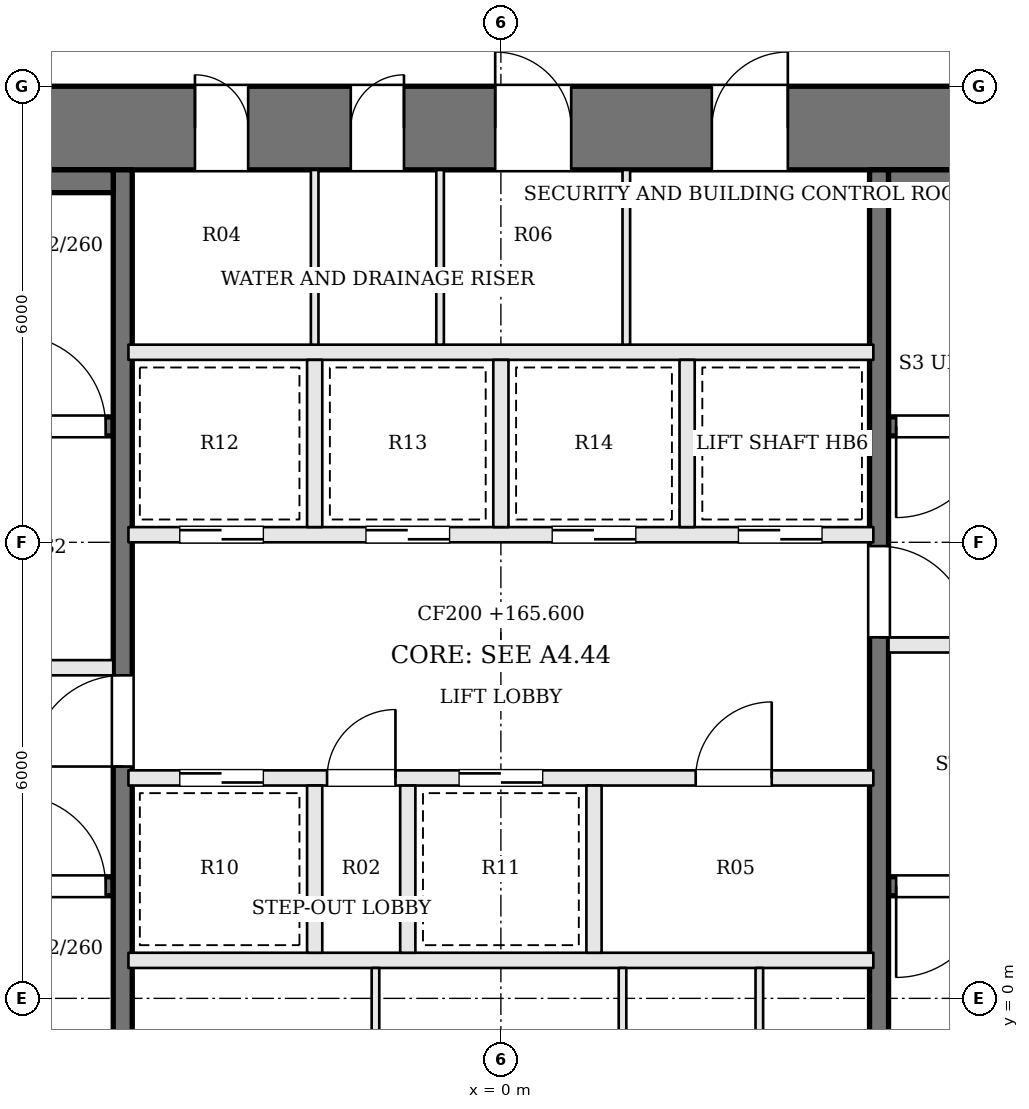
"""IFC4 building model, lengths in metres.
Left out: names, types, materials, properties, quantities, classifications, styles, units other than length and angle.
Written with IfcOpenShell. Run it as: python <this file> out.ifc"""

import sys

from ifc_helpers import new_model, si_unit, direction, frame, frame_2d, origin, place, context, subcontext, project, spatial, rectangle, extrude, element, fill, save


model = new_model("IFC4")
c1 = context("Model", 3, precision=1e-05, world=origin(), true_north=direction((0.0, 1.0)))
c2 = subcontext(c1, "Body", "Model", "MODEL_VIEW")
j1 = project(units=[si_unit("LENGTHUNIT", "METRE"), si_unit("PLANEANGLEUNIT", "RADIAN")], contexts=[c1])
p1 = place(None, origin())
s1 = spatial("IfcSite", under=j1, at=p1, CompositionType="ELEMENT")
p2 = place(p1, origin())
s2 = spatial("IfcBuilding", under=s1, at=p2, CompositionType="ELEMENT")
p3 = place(p2, frame((0.0, 0.0, 165.6)))
s3 = spatial("IfcBuildingStorey", under=s2, at=p3, CompositionType="ELEMENT", Elevation=165.6)
p4 = place(p3, frame((-13.0, 11.45, 0.0), z_axis=(0.0, 0.0, 1.0), x_axis=(1.0, 0.0, 0.0)))
e1 = element("IfcWall", 1, at=p4, inside=s3, PredefinedType="SHEAR", context=c2, shape_type="SweptSolid", body=[
    extrude(rectangle(XDim=26.0, YDim=1.1, at=frame_2d((13.0, 0.0))), origin(), (0.0, 0.0, 1.0), 3.9),
])
p5 = place(p4, frame((8.975, 0.0, 0.0)))
e2 = element("IfcOpeningElement", 2, at=p5, cuts=e1, PredefinedType="OPENING", context=c2, shape_type="SweptSolid", body=[
    extrude(rectangle(XDim=0.7, YDim=2.1, at=frame_2d((0.35, 1.05))), frame((0.0, 0.56, 0.0), z_axis=(0.0, -1.0, 0.0), x_axis=(1.0, 0.0, 0.0)), (0.0, 0.0, 1.0), 1.12),
])
p6 = place(p4, frame((11.025, 0.0, 0.0)))
e3 = element("IfcOpeningElement", 3, at=p6, cuts=e1, PredefinedType="OPENING", context=c2, shape_type="SweptSolid", body=[
    extrude(rectangle(XDim=0.7, YDim=2.1, at=frame_2d((0.35, 1.05))), frame((0.0, 0.56, 0.0), z_axis=(0.0, -1.0, 0.0), x_axis=(1.0, 0.0, 0.0)), (0.0, 0.0, 1.0), 1.12),
])
p7 = place(p4, frame((12.925, 0.0, 0.0)))
e4 = element("IfcOpeningElement", 4, at=p7, cuts=e1, PredefinedType="OPENING", context=c2, shape_type="SweptSolid", body=[
    extrude(rectangle(XDim=1.0, YDim=2.1, at=frame_2d((0.5, 1.05))), frame((0.0, 0.56, 0.0), z_axis=(0.0, -1.0, 0.0), x_axis=(1.0, 0.0, 0.0)), (0.0, 0.0, 1.0), 1.12),
])
p8 = place(p4, frame((15.775, 0.0, 0.0)))
e5 = element("IfcOpeningElement", 5, at=p8, cuts=e1, PredefinedType="OPENING", context=c2, shape_type="SweptSolid", body=[
    extrude(rectangle(XDim=1.0, YDim=2.1, at=frame_2d((0.5, 1.05))), frame((0.0, 0.56, 0.0), z_axis=(0.0, -1.0, 0.0), x_axis=(1.0, 0.0, 0.0)), (0.0, 0.0, 1.0), 1.12),
])
p9 = place(p3, frame((-11.9, 1.475, 0.0), z_axis=(0.0, 0.0, 1.0), x_axis=(1.0, 0.0, 0.0)))
e6 = element("IfcWall", 6, at=p9, inside=s3, PredefinedType="SOLIDWALL", context=c2, shape_type="SweptSolid", body=[
    extrude(rectangle(XDim=6.8, YDim=0.25, at=frame_2d((3.4, 0.0))), origin(), (0.0, 0.0, 1.0), 3.6),
])
p10 = place(p9, frame((5.5, 0.0, 0.0)))
e7 = element("IfcOpeningElement", 7, at=p10, cuts=e6, PredefinedType="OPENING", context=c2, shape_type="SweptSolid", body=[
    extrude(rectangle(XDim=1.2, YDim=2.1, at=frame_2d((0.6, 1.05))), frame((0.0, 0.135, 0.0), z_axis=(0.0, -1.0, 0.0), x_axis=(1.0, 0.0, 0.0)), (0.0, 0.0, 1.0), 0.27),
])
p11 = place(p3, frame((11.9, 7.525, 0.0), z_axis=(0.0, 0.0, 1.0), x_axis=(-1.0, 0.0, 0.0)))
e8 = element("IfcWall", 8, at=p11, inside=s3, PredefinedType="SOLIDWALL", context=c2, shape_type="SweptSolid", body=[
    extrude(rectangle(XDim=6.8, YDim=0.25, at=frame_2d((3.4, 0.0))), origin(), (0.0, 0.0, 1.0), 3.6),
])
p12 = place(p11, frame((5.5, 0.0, 0.0)))
e9 = element("IfcOpeningElement", 9, at=p12, cuts=e8, PredefinedType="OPENING", context=c2, shape_type="SweptSolid", body=[
    extrude(rectangle(XDim=1.2, YDim=2.1, at=frame_2d((0.6, 1.05))), frame((0.0, 0.135, 0.0), z_axis=(0.0, -1.0, 0.0), x_axis=(1.0, 0.0, 0.0)), (0.0, 0.0, 1.0), 0.27),
])
p13 = place(p3, frame((-11.9, 4.35, 0.0), z_axis=(0.0, 0.0, 1.0), x_axis=(1.0, 0.0, 0.0)))
e10 = element("IfcWall", 10, at=p13, inside=s3, PredefinedType="SOLIDWALL", context=c2, shape_type="SweptSolid", body=[
    extrude(rectangle(XDim=6.8, YDim=0.2, at=frame_2d((3.4, 0.0))), origin(), (0.0, 0.0, 1.0), 3.6),
])
p14 = place(p13, frame((4.1, 0.0, 0.0)))
e11 = element("IfcOpeningElement", 11, at=p14, cuts=e10, PredefinedType="OPENING", context=c2, shape_type="SweptSolid", body=[
    extrude(rectangle(XDim=1.2, YDim=2.1, at=frame_2d((0.6, 1.05))), frame((0.0, 0.11, 0.0), z_axis=(0.0, -1.0, 0.0), x_axis=(1.0, 0.0, 0.0)), (0.0, 0.0, 1.0), 0.22),
])
p15 = place(p13, frame((0.8, 0.0, 0.0)))
e12 = element("IfcOpeningElement", 12, at=p15, cuts=e10, PredefinedType="OPENING", context=c2, shape_type="SweptSolid", body=[
    extrude(rectangle(XDim=1.2, YDim=2.1, at=frame_2d((0.6, 1.05))), frame((0.0, 0.11, 0.0), z_axis=(0.0, -1.0, 0.0), x_axis=(1.0, 0.0, 0.0)), (0.0, 0.0, 1.0), 0.22),
])
p16 = place(p3, frame((11.9, 4.65, 0.0), z_axis=(0.0, 0.0, 1.0), x_axis=(-1.0, 0.0, 0.0)))
e13 = element("IfcWall", 13, at=p16, inside=s3, PredefinedType="SOLIDWALL", context=c2, shape_type="SweptSolid", body=[
    extrude(rectangle(XDim=6.8, YDim=0.2, at=frame_2d((3.4, 0.0))), origin(), (0.0, 0.0, 1.0), 3.6),
])
p17 = place(p16, frame((4.1, 0.0, 0.0)))
e14 = element("IfcOpeningElement", 14, at=p17, cuts=e13, PredefinedType="OPENING", context=c2, shape_type="SweptSolid", body=[
    extrude(rectangle(XDim=1.2, YDim=2.1, at=frame_2d((0.6, 1.05))), frame((0.0, 0.11, 0.0), z_axis=(0.0, -1.0, 0.0), x_axis=(1.0, 0.0, 0.0)), (0.0, 0.0, 1.0), 0.22),
])
p18 = place(p16, frame((0.8, 0.0, 0.0)))
e15 = element("IfcOpeningElement", 15, at=p18, cuts=e13, PredefinedType="OPENING", context=c2, shape_type="SweptSolid", body=[
    extrude(rectangle(XDim=1.2, YDim=2.1, at=frame_2d((0.6, 1.05))), frame((0.0, 0.11, 0.0), z_axis=(0.0, -1.0, 0.0), x_axis=(1.0, 0.0, 0.0)), (0.0, 0.0, 1.0), 0.22),
])
p19 = place(p3, frame((-11.9, 7.525, 0.0), z_axis=(0.0, 0.0, 1.0), x_axis=(1.0, 0.0, 0.0)))
e16 = element("IfcWall", 16, at=p19, inside=s3, PredefinedType="SOLIDWALL", context=c2, shape_type="SweptSolid", body=[
    extrude(rectangle(XDim=6.8, YDim=0.25, at=frame_2d((3.4, 0.0))), origin(), (0.0, 0.0, 1.0), 3.6),
])
p20 = place(p19, frame((5.5, 0.0, 0.0)))
e17 = element("IfcOpeningElement", 17, at=p20, cuts=e16, PredefinedType="OPENING", context=c2, shape_type="SweptSolid", body=[
    extrude(rectangle(XDim=1.2, YDim=2.1, at=frame_2d((0.6, 1.05))), frame((0.0, 0.135, 0.0), z_axis=(0.0, -1.0, 0.0), x_axis=(1.0, 0.0, 0.0)), (0.0, 0.0, 1.0), 0.27),
])
p21 = place(p3, frame((11.9, 1.475, 0.0), z_axis=(0.0, 0.0, 1.0), x_axis=(-1.0, 0.0, 0.0)))
e18 = element("IfcWall", 18, at=p21, inside=s3, PredefinedType="SOLIDWALL", context=c2, shape_type="SweptSolid", body=[
    extrude(rectangle(XDim=6.8, YDim=0.25, at=frame_2d((3.4, 0.0))), origin(), (0.0, 0.0, 1.0), 3.6),
])
p22 = place(p21, frame((5.5, 0.0, 0.0)))
e19 = element("IfcOpeningElement", 19, at=p22, cuts=e18, PredefinedType="OPENING", context=c2, shape_type="SweptSolid", body=[
    extrude(rectangle(XDim=1.2, YDim=2.1, at=frame_2d((0.6, 1.05))), frame((0.0, 0.135, 0.0), z_axis=(0.0, -1.0, 0.0), x_axis=(1.0, 0.0, 0.0)), (0.0, 0.0, 1.0), 0.27),
])
p23 = place(p3, frame((-4.975, -1.9, 0.0), z_axis=(0.0, 0.0, 1.0), x_axis=(0.0, 1.0, 0.0)))
e20 = element("IfcWall", 20, at=p23, inside=s3, PredefinedType="SOLIDWALL", context=c2, shape_type="SweptSolid", body=[
    extrude(rectangle(XDim=12.8, YDim=0.25, at=frame_2d((6.4, 0.0))), origin(), (0.0, 0.0, 1.0), 3.6),
])
p24 = place(p23, frame((4.95, 0.0, 0.0)))
e21 = element("IfcOpeningElement", 21, at=p24, cuts=e20, PredefinedType="OPENING", context=c2, shape_type="SweptSolid", body=[
    extrude(rectangle(XDim=1.2, YDim=2.1, at=frame_2d((0.6, 1.05))), frame((0.0, 0.135, 0.0), z_axis=(0.0, -1.0, 0.0), x_axis=(1.0, 0.0, 0.0)), (0.0, 0.0, 1.0), 0.27),
])
p25 = place(p3, frame((4.975, 10.9, 0.0), z_axis=(0.0, 0.0, 1.0), x_axis=(0.0, -1.0, 0.0)))
e22 = element("IfcWall", 22, at=p25, inside=s3, PredefinedType="SOLIDWALL", context=c2, shape_type="SweptSolid", body=[
    extrude(rectangle(XDim=12.8, YDim=0.25, at=frame_2d((6.4, 0.0))), origin(), (0.0, 0.0, 1.0), 3.6),
])
p26 = place(p25, frame((4.95, 0.0, 0.0)))
e23 = element("IfcOpeningElement", 23, at=p26, cuts=e22, PredefinedType="OPENING", context=c2, shape_type="SweptSolid", body=[
    extrude(rectangle(XDim=1.2, YDim=2.1, at=frame_2d((0.6, 1.05))), frame((0.0, 0.135, 0.0), z_axis=(0.0, -1.0, 0.0), x_axis=(1.0, 0.0, 0.0)), (0.0, 0.0, 1.0), 0.27),
])
for number, where, z_axis, x_axis in (
    (24, (-11.9, 10.75, 0.0), (0.0, 0.0, 1.0), (1.0, 0.0, 0.0)),
    (25, (11.9, 10.75, 0.0), (0.0, 0.0, 1.0), (-1.0, 0.0, 0.0)),
):
    element("IfcWall", number, at=place(p3, frame(where, z_axis=z_axis, x_axis=x_axis)), inside=s3, PredefinedType="SOLIDWALL", context=c2, shape_type="SweptSolid", body=[
        extrude(rectangle(XDim=6.8, YDim=0.3, at=frame_2d((3.4, 0.0))), origin(), (0.0, 0.0, 1.0), 3.6),
    ])
p27 = place(p3, frame((-4.9, 0.5, 0.0), z_axis=(0.0, 0.0, 1.0), x_axis=(1.0, 0.0, 0.0)))
e26 = element("IfcWall", 26, at=p27, inside=s3, PredefinedType="SOLIDWALL", context=c2, shape_type="SweptSolid", body=[
    extrude(rectangle(XDim=9.8, YDim=0.2, at=frame_2d((4.9, 0.0))), origin(), (0.0, 0.0, 1.0), 3.6),
])
p28 = place(p3, frame((-4.9, 2.9, 0.0), z_axis=(0.0, 0.0, 1.0), x_axis=(1.0, 0.0, 0.0)))
e27 = element("IfcWall", 27, at=p28, inside=s3, PredefinedType="SOLIDWALL", context=c2, shape_type="SweptSolid", body=[
    extrude(rectangle(XDim=9.8, YDim=0.2, at=frame_2d((4.9, 0.0))), origin(), (0.0, 0.0, 1.0), 3.6),
])
p29 = place(p28, frame((0.675, 0.0, 0.0)))
e28 = element("IfcOpeningElement", 28, at=p29, cuts=e27, PredefinedType="OPENING", context=c2, shape_type="SweptSolid", body=[
    extrude(rectangle(XDim=1.1, YDim=2.1, at=frame_2d((0.55, 1.05))), frame((0.0, 0.11, 0.0), z_axis=(0.0, -1.0, 0.0), x_axis=(1.0, 0.0, 0.0)), (0.0, 0.0, 1.0), 0.22),
])
p30 = place(p28, frame((2.613, 0.0, 0.0)))
e29 = element("IfcOpeningElement", 29, at=p30, cuts=e27, PredefinedType="OPENING", context=c2, shape_type="SweptSolid", body=[
    extrude(rectangle(XDim=0.9, YDim=2.1, at=frame_2d((0.45, 1.05))), frame((0.0, 0.11, 0.0), z_axis=(0.0, -1.0, 0.0), x_axis=(1.0, 0.0, 0.0)), (0.0, 0.0, 1.0), 0.22),
])
p31 = place(p28, frame((4.35, 0.0, 0.0)))
e30 = element("IfcOpeningElement", 30, at=p31, cuts=e27, PredefinedType="OPENING", context=c2, shape_type="SweptSolid", body=[
    extrude(rectangle(XDim=1.1, YDim=2.1, at=frame_2d((0.55, 1.05))), frame((0.0, 0.11, 0.0), z_axis=(0.0, -1.0, 0.0), x_axis=(1.0, 0.0, 0.0)), (0.0, 0.0, 1.0), 0.22),
])
p32 = place(p28, frame((7.463, 0.0, 0.0)))
e31 = element("IfcOpeningElement", 31, at=p32, cuts=e27, PredefinedType="OPENING", context=c2, shape_type="SweptSolid", body=[
    extrude(rectangle(XDim=1.0, YDim=2.1, at=frame_2d((0.5, 1.05))), frame((0.0, 0.11, 0.0), z_axis=(0.0, -1.0, 0.0), x_axis=(1.0, 0.0, 0.0)), (0.0, 0.0, 1.0), 0.22),
])
p33 = place(p3, frame((-4.9, 6.1, 0.0), z_axis=(0.0, 0.0, 1.0), x_axis=(1.0, 0.0, 0.0)))
e32 = element("IfcWall", 32, at=p33, inside=s3, PredefinedType="SOLIDWALL", context=c2, shape_type="SweptSolid", body=[
    extrude(rectangle(XDim=9.8, YDim=0.2, at=frame_2d((4.9, 0.0))), origin(), (0.0, 0.0, 1.0), 3.6),
])
p34 = place(p33, frame((0.675, 0.0, 0.0)))
e33 = element("IfcOpeningElement", 33, at=p34, cuts=e32, PredefinedType="OPENING", context=c2, shape_type="SweptSolid", body=[
    extrude(rectangle(XDim=1.1, YDim=2.1, at=frame_2d((0.55, 1.05))), frame((0.0, 0.11, 0.0), z_axis=(0.0, -1.0, 0.0), x_axis=(1.0, 0.0, 0.0)), (0.0, 0.0, 1.0), 0.22),
])
p35 = place(p33, frame((3.125, 0.0, 0.0)))
e34 = element("IfcOpeningElement", 34, at=p35, cuts=e32, PredefinedType="OPENING", context=c2, shape_type="SweptSolid", body=[
    extrude(rectangle(XDim=1.1, YDim=2.1, at=frame_2d((0.55, 1.05))), frame((0.0, 0.11, 0.0), z_axis=(0.0, -1.0, 0.0), x_axis=(1.0, 0.0, 0.0)), (0.0, 0.0, 1.0), 0.22),
])
p36 = place(p33, frame((5.575, 0.0, 0.0)))
e35 = element("IfcOpeningElement", 35, at=p36, cuts=e32, PredefinedType="OPENING", context=c2, shape_type="SweptSolid", body=[
    extrude(rectangle(XDim=1.1, YDim=2.1, at=frame_2d((0.55, 1.05))), frame((0.0, 0.11, 0.0), z_axis=(0.0, -1.0, 0.0), x_axis=(1.0, 0.0, 0.0)), (0.0, 0.0, 1.0), 0.22),
])
p37 = place(p33, frame((8.025, 0.0, 0.0)))
e36 = element("IfcOpeningElement", 36, at=p37, cuts=e32, PredefinedType="OPENING", context=c2, shape_type="SweptSolid", body=[
    extrude(rectangle(XDim=1.1, YDim=2.1, at=frame_2d((0.55, 1.05))), frame((0.0, 0.11, 0.0), z_axis=(0.0, -1.0, 0.0), x_axis=(1.0, 0.0, 0.0)), (0.0, 0.0, 1.0), 0.22),
])
p38 = place(p3, frame((-4.9, 8.5, 0.0), z_axis=(0.0, 0.0, 1.0), x_axis=(1.0, 0.0, 0.0)))
e37 = element("IfcWall", 37, at=p38, inside=s3, PredefinedType="SOLIDWALL", context=c2, shape_type="SweptSolid", body=[
    extrude(rectangle(XDim=9.8, YDim=0.2, at=frame_2d((4.9, 0.0))), origin(), (0.0, 0.0, 1.0), 3.6),
])
for number, where, z_axis, x_axis in (
    (38, (-2.45, 0.6, 0.0), (0.0, 0.0, 1.0), (0.0, 1.0, 0.0)),
    (39, (-1.225, 0.6, 0.0), (0.0, 0.0, 1.0), (0.0, 1.0, 0.0)),
    (40, (1.225, 0.6, 0.0), (0.0, 0.0, 1.0), (0.0, 1.0, 0.0)),
    (41, (-2.45, 6.2, 0.0), (0.0, 0.0, 1.0), (0.0, 1.0, 0.0)),
    (42, (0.0, 6.2, 0.0), (0.0, 0.0, 1.0), (0.0, 1.0, 0.0)),
    (43, (2.45, 6.2, 0.0), (0.0, 0.0, 1.0), (0.0, 1.0, 0.0)),
):
    element("IfcWall", number, at=place(p3, frame(where, z_axis=z_axis, x_axis=x_axis)), inside=s3, PredefinedType="SOLIDWALL", context=c2, shape_type="SweptSolid", body=[
        extrude(rectangle(XDim=2.2, YDim=0.2, at=frame_2d((1.1, 0.0))), origin(), (0.0, 0.0, 1.0), 3.6),
    ])
for number, where, z_axis, x_axis in (
    (44, (-1.65, -1.9, 0.0), (0.0, 0.0, 1.0), (0.0, 1.0, 0.0)),
    (45, (1.6, -1.9, 0.0), (0.0, 0.0, 1.0), (0.0, 1.0, 0.0)),
    (46, (3.4, -1.9, 0.0), (0.0, 0.0, 1.0), (0.0, 1.0, 0.0)),
    (47, (-2.45, 8.6, 0.0), (0.0, 0.0, 1.0), (0.0, 1.0, 0.0)),
    (48, (-0.8, 8.6, 0.0), (0.0, 0.0, 1.0), (0.0, 1.0, 0.0)),
    (49, (1.65, 8.6, 0.0), (0.0, 0.0, 1.0), (0.0, 1.0, 0.0)),
):
    element("IfcWall", number, at=place(p3, frame(where, z_axis=z_axis, x_axis=x_axis)), inside=s3, PredefinedType="PARTITIONING", context=c2, shape_type="SweptSolid", body=[
        extrude(rectangle(XDim=2.3, YDim=0.1, at=frame_2d((1.15, 0.0))), origin(), (0.0, 0.0, 1.0), 3.6),
    ])
p39 = place(p24, origin())
e50 = element("IfcDoor", 50, at=p39, inside=s3, OperationType="SINGLE_SWING_LEFT", PredefinedType="DOOR", context=c2, shape_type="SweptSolid", body=[
    extrude(rectangle(XDim=1.2, YDim=2.1, at=frame_2d((0.6, 1.05))), frame((0.0, 0.025, 0.0), z_axis=(0.0, -1.0, 0.0), x_axis=(1.0, 0.0, 0.0)), (0.0, 0.0, 1.0), 0.05),
])
fill(e21, e50)
p40 = place(p26, origin())
e51 = element("IfcDoor", 51, at=p40, inside=s3, OperationType="SINGLE_SWING_RIGHT", PredefinedType="DOOR", context=c2, shape_type="SweptSolid", body=[
    extrude(rectangle(XDim=1.2, YDim=2.1, at=frame_2d((0.6, 1.05))), frame((0.0, 0.025, 0.0), z_axis=(0.0, -1.0, 0.0), x_axis=(1.0, 0.0, 0.0)), (0.0, 0.0, 1.0), 0.05),
])
fill(e23, e51)
p41 = place(p10, origin())
e52 = element("IfcDoor", 52, at=p41, inside=s3, OperationType="SINGLE_SWING_LEFT", PredefinedType="DOOR", context=c2, shape_type="SweptSolid", body=[
    extrude(rectangle(XDim=1.2, YDim=2.1, at=frame_2d((0.6, 1.05))), frame((0.0, 0.025, 0.0), z_axis=(0.0, -1.0, 0.0), x_axis=(1.0, 0.0, 0.0)), (0.0, 0.0, 1.0), 0.05),
])
fill(e7, e52)
p42 = place(p12, origin())
e53 = element("IfcDoor", 53, at=p42, inside=s3, OperationType="SINGLE_SWING_RIGHT", PredefinedType="DOOR", context=c2, shape_type="SweptSolid", body=[
    extrude(rectangle(XDim=1.2, YDim=2.1, at=frame_2d((0.6, 1.05))), frame((0.0, 0.025, 0.0), z_axis=(0.0, -1.0, 0.0), x_axis=(1.0, 0.0, 0.0)), (0.0, 0.0, 1.0), 0.05),
])
fill(e9, e53)
p43 = place(p20, origin())
e54 = element("IfcDoor", 54, at=p43, inside=s3, OperationType="SINGLE_SWING_LEFT", PredefinedType="DOOR", context=c2, shape_type="SweptSolid", body=[
    extrude(rectangle(XDim=1.2, YDim=2.1, at=frame_2d((0.6, 1.05))), frame((0.0, 0.025, 0.0), z_axis=(0.0, -1.0, 0.0), x_axis=(1.0, 0.0, 0.0)), (0.0, 0.0, 1.0), 0.05),
])
fill(e17, e54)
p44 = place(p22, origin())
e55 = element("IfcDoor", 55, at=p44, inside=s3, OperationType="SINGLE_SWING_RIGHT", PredefinedType="DOOR", context=c2, shape_type="SweptSolid", body=[
    extrude(rectangle(XDim=1.2, YDim=2.1, at=frame_2d((0.6, 1.05))), frame((0.0, 0.025, 0.0), z_axis=(0.0, -1.0, 0.0), x_axis=(1.0, 0.0, 0.0)), (0.0, 0.0, 1.0), 0.05),
])
fill(e19, e55)
p45 = place(p29, origin())
e56 = element("IfcDoor", 56, at=p45, inside=s3, OperationType="SLIDING_TO_RIGHT", PredefinedType="DOOR", context=c2, shape_type="SweptSolid", body=[
    extrude(rectangle(XDim=1.1, YDim=2.1, at=frame_2d((0.55, 1.05))), frame((0.0, 0.025, 0.0), z_axis=(0.0, -1.0, 0.0), x_axis=(1.0, 0.0, 0.0)), (0.0, 0.0, 1.0), 0.05),
])
fill(e28, e56)
p46 = place(p30, origin())
e57 = element("IfcDoor", 57, at=p46, inside=s3, OperationType="SINGLE_SWING_RIGHT", PredefinedType="DOOR", context=c2, shape_type="SweptSolid", body=[
    extrude(rectangle(XDim=0.9, YDim=2.1, at=frame_2d((0.45, 1.05))), frame((0.0, 0.025, 0.0), z_axis=(0.0, -1.0, 0.0), x_axis=(1.0, 0.0, 0.0)), (0.0, 0.0, 1.0), 0.05),
])
fill(e29, e57)
p47 = place(p31, origin())
e58 = element("IfcDoor", 58, at=p47, inside=s3, OperationType="SLIDING_TO_LEFT", PredefinedType="DOOR", context=c2, shape_type="SweptSolid", body=[
    extrude(rectangle(XDim=1.1, YDim=2.1, at=frame_2d((0.55, 1.05))), frame((0.0, 0.025, 0.0), z_axis=(0.0, -1.0, 0.0), x_axis=(1.0, 0.0, 0.0)), (0.0, 0.0, 1.0), 0.05),
])
fill(e30, e58)
p48 = place(p32, origin())
e59 = element("IfcDoor", 59, at=p48, inside=s3, OperationType="SINGLE_SWING_RIGHT", PredefinedType="DOOR", context=c2, shape_type="SweptSolid", body=[
    extrude(rectangle(XDim=1.0, YDim=2.1, at=frame_2d((0.5, 1.05))), frame((0.0, 0.025, 0.0), z_axis=(0.0, -1.0, 0.0), x_axis=(1.0, 0.0, 0.0)), (0.0, 0.0, 1.0), 0.05),
])
fill(e31, e59)
p49 = place(p34, origin())
e60 = element("IfcDoor", 60, at=p49, inside=s3, OperationType="SLIDING_TO_RIGHT", PredefinedType="DOOR", context=c2, shape_type="SweptSolid", body=[
    extrude(rectangle(XDim=1.1, YDim=2.1, at=frame_2d((0.55, 1.05))), frame((0.0, 0.025, 0.0), z_axis=(0.0, -1.0, 0.0), x_axis=(1.0, 0.0, 0.0)), (0.0, 0.0, 1.0), 0.05),
])
fill(e33, e60)
p50 = place(p35, origin())
e61 = element("IfcDoor", 61, at=p50, inside=s3, OperationType="SLIDING_TO_LEFT", PredefinedType="DOOR", context=c2, shape_type="SweptSolid", body=[
    extrude(rectangle(XDim=1.1, YDim=2.1, at=frame_2d((0.55, 1.05))), frame((0.0, 0.025, 0.0), z_axis=(0.0, -1.0, 0.0), x_axis=(1.0, 0.0, 0.0)), (0.0, 0.0, 1.0), 0.05),
])
fill(e34, e61)
p51 = place(p36, origin())
e62 = element("IfcDoor", 62, at=p51, inside=s3, OperationType="SLIDING_TO_RIGHT", PredefinedType="DOOR", context=c2, shape_type="SweptSolid", body=[
    extrude(rectangle(XDim=1.1, YDim=2.1, at=frame_2d((0.55, 1.05))), frame((0.0, 0.025, 0.0), z_axis=(0.0, -1.0, 0.0), x_axis=(1.0, 0.0, 0.0)), (0.0, 0.0, 1.0), 0.05),
])
fill(e35, e62)
p52 = place(p37, origin())
e63 = element("IfcDoor", 63, at=p52, inside=s3, OperationType="SLIDING_TO_LEFT", PredefinedType="DOOR", context=c2, shape_type="SweptSolid", body=[
    extrude(rectangle(XDim=1.1, YDim=2.1, at=frame_2d((0.55, 1.05))), frame((0.0, 0.025, 0.0), z_axis=(0.0, -1.0, 0.0), x_axis=(1.0, 0.0, 0.0)), (0.0, 0.0, 1.0), 0.05),
])
fill(e36, e63)
p53 = place(p5, origin())
e64 = element("IfcDoor", 64, at=p53, inside=s3, OperationType="SINGLE_SWING_LEFT", PredefinedType="DOOR", context=c2, shape_type="SweptSolid", body=[
    extrude(rectangle(XDim=0.7, YDim=2.1, at=frame_2d((0.35, 1.05))), frame((0.0, 0.025, 0.0), z_axis=(0.0, -1.0, 0.0), x_axis=(1.0, 0.0, 0.0)), (0.0, 0.0, 1.0), 0.05),
])
fill(e2, e64)
p54 = place(p6, origin())
e65 = element("IfcDoor", 65, at=p54, inside=s3, OperationType="SINGLE_SWING_RIGHT", PredefinedType="DOOR", context=c2, shape_type="SweptSolid", body=[
    extrude(rectangle(XDim=0.7, YDim=2.1, at=frame_2d((0.35, 1.05))), frame((0.0, 0.025, 0.0), z_axis=(0.0, -1.0, 0.0), x_axis=(1.0, 0.0, 0.0)), (0.0, 0.0, 1.0), 0.05),
])
fill(e3, e65)
p55 = place(p7, origin())
e66 = element("IfcDoor", 66, at=p55, inside=s3, OperationType="SINGLE_SWING_LEFT", PredefinedType="DOOR", context=c2, shape_type="SweptSolid", body=[
    extrude(rectangle(XDim=1.0, YDim=2.1, at=frame_2d((0.5, 1.05))), frame((0.0, 0.025, 0.0), z_axis=(0.0, -1.0, 0.0), x_axis=(1.0, 0.0, 0.0)), (0.0, 0.0, 1.0), 0.05),
])
fill(e4, e66)
p56 = place(p8, origin())
e67 = element("IfcDoor", 67, at=p56, inside=s3, OperationType="SINGLE_SWING_RIGHT", PredefinedType="DOOR", context=c2, shape_type="SweptSolid", body=[
    extrude(rectangle(XDim=1.0, YDim=2.1, at=frame_2d((0.5, 1.05))), frame((0.0, 0.025, 0.0), z_axis=(0.0, -1.0, 0.0), x_axis=(1.0, 0.0, 0.0)), (0.0, 0.0, 1.0), 0.05),
])
fill(e5, e67)
save(model, sys.argv[1])
